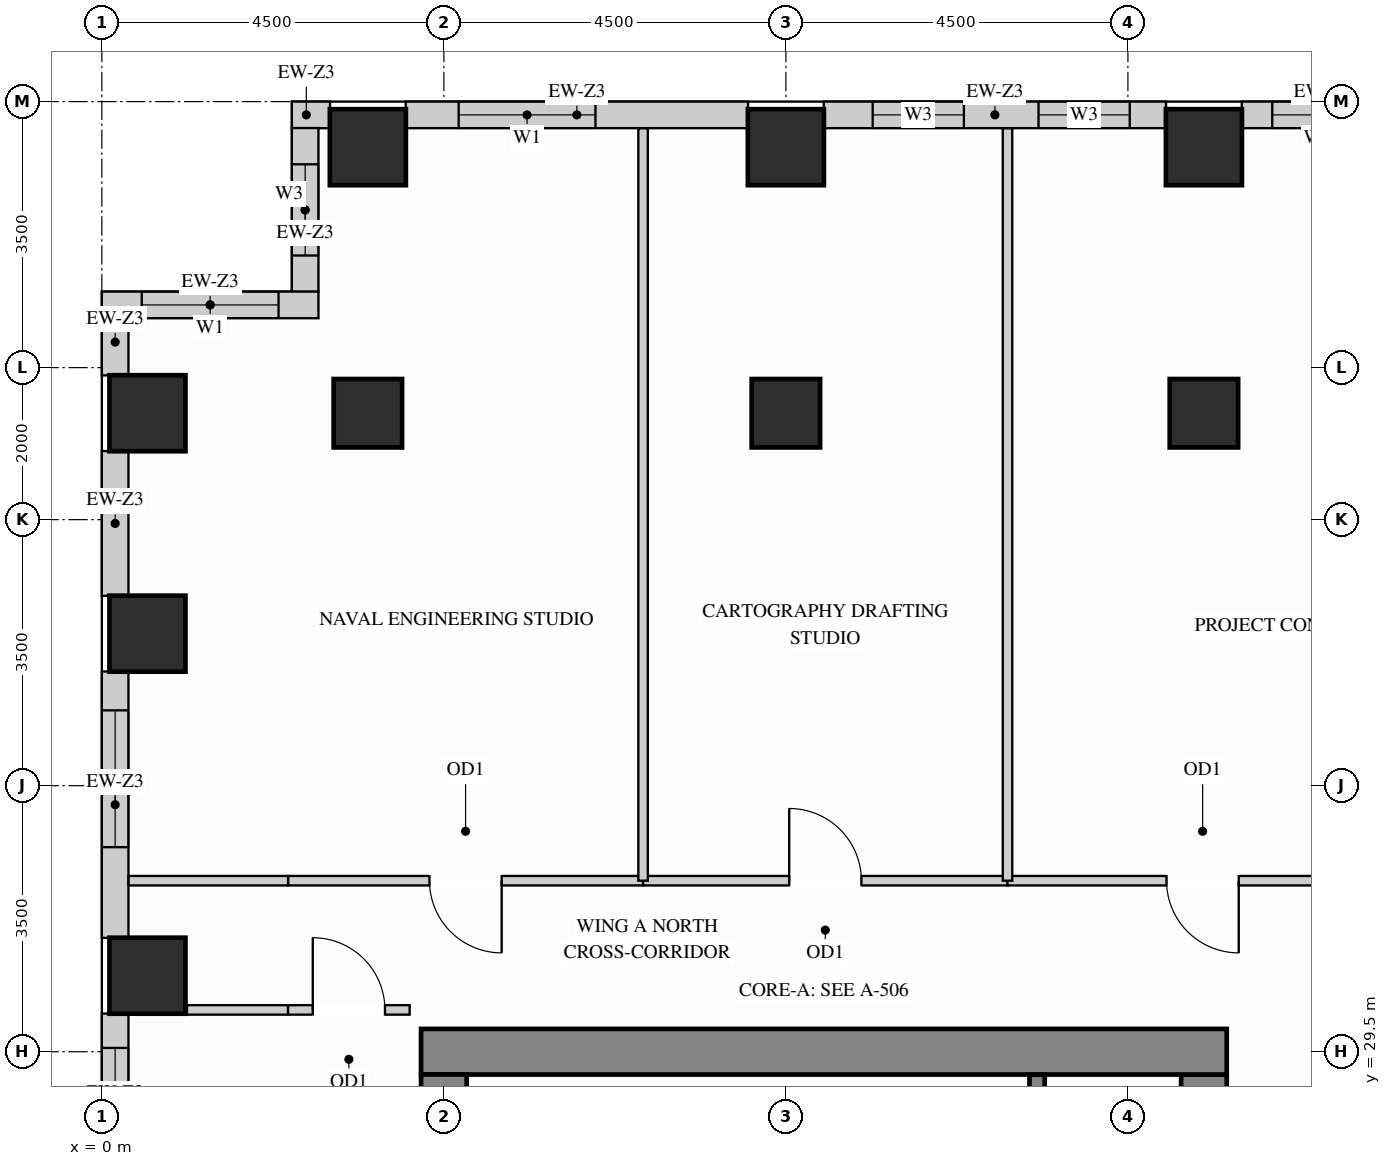
"""IFC4 building model, lengths in metres.
Left out: names, types, materials, properties, quantities, classifications, styles, units other than length and angle.
Written with IfcOpenShell. Run it as: python <this file> out.ifc"""

import sys

from ifc_helpers import new_model, si_unit, direction, frame, frame_2d, origin, origin_2d, place, context, subcontext, project, spatial, rectangle, extrude, source, transform, mapped, element, fill, save


model = new_model("IFC4")
c1 = context("Model", 3, precision=1e-05, world=origin(), true_north=direction((0.0, 1.0)))
c2 = subcontext(c1, "Body", "Model", "MODEL_VIEW")
j1 = project(units=[si_unit("LENGTHUNIT", "METRE"), si_unit("PLANEANGLEUNIT", "RADIAN")], contexts=[c1])
p1 = place(None, origin())
s1 = spatial("IfcSite", under=j1, at=p1, CompositionType="ELEMENT")
p2 = place(p1, origin())
s2 = spatial("IfcBuilding", under=s1, at=p2, CompositionType="ELEMENT")
p3 = place(p2, frame((0.0, 0.0, 150.3)))
s3 = spatial("IfcBuildingStorey", under=s2, at=p3, CompositionType="ELEMENT", Elevation=150.3)
m1 = source(origin(), c2, "Body", "SweptSolid", [
    extrude(rectangle(XDim=0.9, YDim=0.9, at=origin_2d()), origin(), (0.0, 0.0, 1.0), 3.4),
])
for number, where, z_axis, x_axis in (
    (1, (14.5, 37.9, 0.0), (0.0, 0.0, 1.0), (1.0, 0.0, 0.0)),
    (2, (3.5, 37.9, 0.0), (0.0, 0.0, 1.0), (1.0, 0.0, 0.0)),
    (3, (9.0, 37.9, 0.0), (0.0, 0.0, 1.0), (1.0, 0.0, 0.0)),
):
    element("IfcColumn", number, at=place(p3, frame(where, z_axis=z_axis, x_axis=x_axis)), inside=s3, PredefinedType="COLUMN", context=c2, shape_type="MappedRepresentation", body=[
        mapped(m1, transform((0.0, 0.0, 0.0), x_axis=(1.0, 0.0, 0.0), y_axis=(0.0, 1.0, 0.0), z_axis=(0.0, 0.0, 1.0))),
    ])
m2 = source(origin(), c2, "Body", "SweptSolid", [
    extrude(rectangle(XDim=1.0, YDim=1.0, at=origin_2d()), origin(), (0.0, 0.0, 1.0), 3.4),
])
for number, where, z_axis, x_axis in (
    (4, (14.5, 41.4, 0.0), (0.0, 0.0, 1.0), (1.0, 0.0, 0.0)),
    (5, (3.5, 41.4, 0.0), (0.0, 0.0, 1.0), (1.0, 0.0, 0.0)),
    (6, (9.0, 41.4, 0.0), (0.0, 0.0, 1.0), (1.0, 0.0, 0.0)),
    (7, (0.6, 30.5, 0.0), (0.0, 0.0, 1.0), (1.0, 0.0, 0.0)),
    (8, (0.6, 35.0, 0.0), (0.0, 0.0, 1.0), (1.0, 0.0, 0.0)),
    (9, (0.6, 37.9, 0.0), (0.0, 0.0, 1.0), (1.0, 0.0, 0.0)),
):
    element("IfcColumn", number, at=place(p3, frame(where, z_axis=z_axis, x_axis=x_axis)), inside=s3, PredefinedType="COLUMN", context=c2, shape_type="MappedRepresentation", body=[
        mapped(m2, transform((0.0, 0.0, 0.0), x_axis=(1.0, 0.0, 0.0), y_axis=(0.0, 1.0, 0.0), z_axis=(0.0, 0.0, 1.0))),
    ])
m3 = source(origin(), c2, "Body", "SweptSolid", [
    extrude(rectangle(XDim=8.32, YDim=0.6, at=frame_2d((4.16, 0.0))), origin(), (0.0, 0.0, 1.0), 3.4),
])
p4 = place(p3, frame((14.5, 20.88, 0.0), z_axis=(0.0, 0.0, 1.0), x_axis=(0.0, 1.0, 0.0)))
e10 = element("IfcWall", 10, at=p4, inside=s3, PredefinedType="SHEAR", context=c2, shape_type="MappedRepresentation", body=[
    mapped(m3, transform((0.0, 0.0, 0.0), x_axis=(1.0, 0.0, 0.0), y_axis=(0.0, 1.0, 0.0), z_axis=(0.0, 0.0, 1.0))),
])
m4 = source(origin(), c2, "Body", "SweptSolid", [
    extrude(rectangle(XDim=10.6, YDim=0.6, at=frame_2d((5.3, 0.0))), origin(), (0.0, 0.0, 1.0), 3.4),
])
p5 = place(p3, frame((4.2, 29.5, 0.0), z_axis=(0.0, 0.0, 1.0), x_axis=(1.0, 0.0, 0.0)))
e11 = element("IfcWall", 11, at=p5, inside=s3, PredefinedType="SHEAR", context=c2, shape_type="MappedRepresentation", body=[
    mapped(m4, transform((0.0, 0.0, 0.0), x_axis=(1.0, 0.0, 0.0), y_axis=(0.0, 1.0, 0.0), z_axis=(0.0, 0.0, 1.0))),
])
m5 = source(origin(), c2, "Body", "SweptSolid", [
    extrude(rectangle(XDim=20.4, YDim=0.6, at=frame_2d((10.2, 0.0))), origin(), (0.0, 0.0, 1.0), 3.4),
])
p6 = place(p3, frame((4.5, 8.8, 0.0), z_axis=(0.0, 0.0, 1.0), x_axis=(0.0, 1.0, 0.0)))
e12 = element("IfcWall", 12, at=p6, inside=s3, PredefinedType="SHEAR", context=c2, shape_type="MappedRepresentation", body=[
    mapped(m5, transform((0.0, 0.0, 0.0), x_axis=(1.0, 0.0, 0.0), y_axis=(0.0, 1.0, 0.0), z_axis=(0.0, 0.0, 1.0))),
])
p7 = place(p3, frame((17.0, 41.825, 0.0), z_axis=(0.0, 0.0, 1.0), x_axis=(-1.0, 0.0, 0.0)))
e13 = element("IfcWall", 13, at=p7, inside=s3, PredefinedType="SOLIDWALL", context=c2, shape_type="SweptSolid", body=[
    extrude(rectangle(XDim=2.002, YDim=0.35, at=frame_2d((1.001, 0.0))), origin(), (0.0, 0.0, 1.0), 3.385),
])
p8 = place(p7, frame((0.401, 0.0, 0.78)))
e14 = element("IfcOpeningElement", 14, at=p8, cuts=e13, PredefinedType="OPENING", context=c2, shape_type="SweptSolid", body=[
    extrude(rectangle(XDim=1.2, YDim=2.1, at=frame_2d((0.6, 1.05))), frame((0.0, 0.185, 0.0), z_axis=(0.0, -1.0, 0.0), x_axis=(1.0, 0.0, 0.0)), (0.0, 0.0, 1.0), 0.37),
])
p9 = place(p3, frame((14.002, 41.825, 0.0), z_axis=(0.0, 0.0, 1.0), x_axis=(-1.0, 0.0, 0.0)))
e15 = element("IfcWall", 15, at=p9, inside=s3, PredefinedType="SOLIDWALL", context=c2, shape_type="SweptSolid", body=[
    extrude(rectangle(XDim=4.504, YDim=0.35, at=frame_2d((2.252, 0.0))), origin(), (0.0, 0.0, 1.0), 2.612),
])
p10 = place(p9, frame((0.478, 0.0, 0.78)))
e16 = element("IfcOpeningElement", 16, at=p10, cuts=e15, PredefinedType="OPENING", context=c2, shape_type="SweptSolid", body=[
    extrude(rectangle(XDim=1.2, YDim=1.652, at=frame_2d((0.6, 0.826))), frame((0.0, 0.185, 0.0), z_axis=(0.0, -1.0, 0.0), x_axis=(1.0, 0.0, 0.0)), (0.0, 0.0, 1.0), 0.37),
])
p11 = place(p9, frame((2.66, 0.0, 0.78)))
e17 = element("IfcOpeningElement", 17, at=p11, cuts=e15, PredefinedType="OPENING", context=c2, shape_type="SweptSolid", body=[
    extrude(rectangle(XDim=1.2, YDim=1.652, at=frame_2d((0.6, 0.826))), frame((0.0, 0.185, 0.0), z_axis=(0.0, -1.0, 0.0), x_axis=(1.0, 0.0, 0.0)), (0.0, 0.0, 1.0), 0.37),
])
p12 = place(p3, frame((8.502, 41.825, 0.0), z_axis=(0.0, 0.0, 1.0), x_axis=(-1.0, 0.0, 0.0)))
e18 = element("IfcWall", 18, at=p12, inside=s3, PredefinedType="SOLIDWALL", context=c2, shape_type="SweptSolid", body=[
    extrude(rectangle(XDim=4.504, YDim=0.35, at=frame_2d((2.252, 0.0))), origin(), (0.0, 0.0, 1.0), 2.612),
])
p13 = place(p12, frame((2.008, 0.0, 0.78)))
e19 = element("IfcOpeningElement", 19, at=p13, cuts=e18, PredefinedType="OPENING", context=c2, shape_type="SweptSolid", body=[
    extrude(rectangle(XDim=1.8, YDim=1.652, at=frame_2d((0.9, 0.826))), frame((0.0, 0.185, 0.0), z_axis=(0.0, -1.0, 0.0), x_axis=(1.0, 0.0, 0.0)), (0.0, 0.0, 1.0), 0.37),
])
m6 = source(origin(), c2, "Body", "SweptSolid", [
    extrude(rectangle(XDim=0.502, YDim=0.35, at=frame_2d((0.251, 0.0))), origin(), (0.0, 0.0, 1.0), 3.385),
])
p14 = place(p3, frame((3.002, 41.825, 0.0), z_axis=(0.0, 0.0, 1.0), x_axis=(-1.0, 0.0, 0.0)))
e20 = element("IfcWall", 20, at=p14, inside=s3, PredefinedType="SOLIDWALL", context=c2, shape_type="MappedRepresentation", body=[
    mapped(m6, transform((0.0, 0.0, 0.0), x_axis=(1.0, 0.0, 0.0), y_axis=(0.0, 1.0, 0.0), z_axis=(0.0, 0.0, 1.0))),
])
p15 = place(p3, frame((2.675, 41.652, 0.0), z_axis=(0.0, 0.0, 1.0), x_axis=(0.0, -1.0, 0.0)))
e21 = element("IfcWall", 21, at=p15, inside=s3, PredefinedType="SOLIDWALL", context=c2, shape_type="SweptSolid", body=[
    extrude(rectangle(XDim=2.154, YDim=0.35, at=frame_2d((1.077, 0.0))), origin(), (0.0, 0.0, 1.0), 3.385),
])
p16 = place(p15, frame((0.477, 0.0, 0.78)))
e22 = element("IfcOpeningElement", 22, at=p16, cuts=e21, PredefinedType="OPENING", context=c2, shape_type="SweptSolid", body=[
    extrude(rectangle(XDim=1.2, YDim=2.1, at=frame_2d((0.6, 1.05))), frame((0.0, 0.185, 0.0), z_axis=(0.0, -1.0, 0.0), x_axis=(1.0, 0.0, 0.0)), (0.0, 0.0, 1.0), 0.37),
])
p17 = place(p3, frame((2.85, 39.325, 0.0), z_axis=(0.0, 0.0, 1.0), x_axis=(-1.0, 0.0, 0.0)))
e23 = element("IfcWall", 23, at=p17, inside=s3, PredefinedType="SOLIDWALL", context=c2, shape_type="SweptSolid", body=[
    extrude(rectangle(XDim=2.85, YDim=0.35, at=frame_2d((1.425, 0.0))), origin(), (0.0, 0.0, 1.0), 3.385),
])
p18 = place(p17, frame((0.525, 0.0, 0.78)))
e24 = element("IfcOpeningElement", 24, at=p18, cuts=e23, PredefinedType="OPENING", context=c2, shape_type="SweptSolid", body=[
    extrude(rectangle(XDim=1.8, YDim=2.1, at=frame_2d((0.9, 1.05))), frame((0.0, 0.185, 0.0), z_axis=(0.0, -1.0, 0.0), x_axis=(1.0, 0.0, 0.0)), (0.0, 0.0, 1.0), 0.37),
])
m7 = source(origin(), c2, "Body", "SweptSolid", [
    extrude(rectangle(XDim=0.754, YDim=0.35, at=frame_2d((0.377, 0.0))), origin(), (0.0, 0.0, 1.0), 3.385),
])
p19 = place(p3, frame((0.175, 39.152, 0.0), z_axis=(0.0, 0.0, 1.0), x_axis=(0.0, -1.0, 0.0)))
e25 = element("IfcWall", 25, at=p19, inside=s3, PredefinedType="SOLIDWALL", context=c2, shape_type="MappedRepresentation", body=[
    mapped(m7, transform((0.0, 0.0, 0.0), x_axis=(1.0, 0.0, 0.0), y_axis=(0.0, 1.0, 0.0), z_axis=(0.0, 0.0, 1.0))),
])
m8 = source(origin(), c2, "Body", "SweptSolid", [
    extrude(rectangle(XDim=1.904, YDim=0.35, at=frame_2d((0.952, 0.0))), origin(), (0.0, 0.0, 1.0), 2.612),
])
p20 = place(p3, frame((0.175, 37.402, 0.0), z_axis=(0.0, 0.0, 1.0), x_axis=(0.0, -1.0, 0.0)))
e26 = element("IfcWall", 26, at=p20, inside=s3, PredefinedType="SOLIDWALL", context=c2, shape_type="MappedRepresentation", body=[
    mapped(m8, transform((0.0, 0.0, 0.0), x_axis=(1.0, 0.0, 0.0), y_axis=(0.0, 1.0, 0.0), z_axis=(0.0, 0.0, 1.0))),
])
p21 = place(p3, frame((0.175, 34.502, 0.0), z_axis=(0.0, 0.0, 1.0), x_axis=(0.0, -1.0, 0.0)))
e27 = element("IfcWall", 27, at=p21, inside=s3, PredefinedType="SOLIDWALL", context=c2, shape_type="SweptSolid", body=[
    extrude(rectangle(XDim=3.504, YDim=0.35, at=frame_2d((1.752, 0.0))), origin(), (0.0, 0.0, 1.0), 2.612),
])
p22 = place(p21, frame((0.511, 0.0, 0.78)))
e28 = element("IfcOpeningElement", 28, at=p22, cuts=e27, PredefinedType="OPENING", context=c2, shape_type="SweptSolid", body=[
    extrude(rectangle(XDim=1.8, YDim=1.652, at=frame_2d((0.9, 0.826))), frame((0.0, 0.185, 0.0), z_axis=(0.0, -1.0, 0.0), x_axis=(1.0, 0.0, 0.0)), (0.0, 0.0, 1.0), 0.37),
])
p23 = place(p3, frame((0.175, 30.002, 0.0), z_axis=(0.0, 0.0, 1.0), x_axis=(0.0, -1.0, 0.0)))
e29 = element("IfcWall", 29, at=p23, inside=s3, PredefinedType="SOLIDWALL", context=c2, shape_type="SweptSolid", body=[
    extrude(rectangle(XDim=2.704, YDim=0.35, at=frame_2d((1.352, 0.0))), origin(), (0.0, 0.0, 1.0), 2.612),
])
p24 = place(p23, frame((0.452, 0.0, 0.78)))
e30 = element("IfcOpeningElement", 30, at=p24, cuts=e29, PredefinedType="OPENING", context=c2, shape_type="SweptSolid", body=[
    extrude(rectangle(XDim=1.8, YDim=1.652, at=frame_2d((0.9, 0.826))), frame((0.0, 0.185, 0.0), z_axis=(0.0, -1.0, 0.0), x_axis=(1.0, 0.0, 0.0)), (0.0, 0.0, 1.0), 0.37),
])
p25 = place(p3, frame((2.45, 31.75, 0.0), z_axis=(0.0, 0.0, 1.0), x_axis=(1.0, 0.0, 0.0)))
e31 = element("IfcWall", 31, at=p25, inside=s3, PredefinedType="PARTITIONING", context=c2, shape_type="SweptSolid", body=[
    extrude(rectangle(XDim=4.671, YDim=0.125, at=frame_2d((2.335, 0.0))), origin(), (0.0, 0.0, 1.0), 2.848),
])
p26 = place(p25, frame((1.861, 0.0, 0.0)))
e32 = element("IfcOpeningElement", 32, at=p26, cuts=e31, PredefinedType="OPENING", context=c2, shape_type="SweptSolid", body=[
    extrude(rectangle(XDim=0.95, YDim=2.15, at=frame_2d((0.475, 1.075))), frame((0.0, 0.073, 0.0), z_axis=(0.0, -1.0, 0.0), x_axis=(1.0, 0.0, 0.0)), (0.0, 0.0, 1.0), 0.145),
])
p27 = place(p3, frame((7.121, 31.75, 0.0), z_axis=(0.0, 0.0, 1.0), x_axis=(1.0, 0.0, 0.0)))
e33 = element("IfcWall", 33, at=p27, inside=s3, PredefinedType="PARTITIONING", context=c2, shape_type="SweptSolid", body=[
    extrude(rectangle(XDim=4.795, YDim=0.125, at=frame_2d((2.397, 0.0))), origin(), (0.0, 0.0, 1.0), 2.848),
])
p28 = place(p27, frame((1.923, 0.0, 0.0)))
e34 = element("IfcOpeningElement", 34, at=p28, cuts=e33, PredefinedType="OPENING", context=c2, shape_type="SweptSolid", body=[
    extrude(rectangle(XDim=0.95, YDim=2.15, at=frame_2d((0.475, 1.075))), frame((0.0, 0.073, 0.0), z_axis=(0.0, -1.0, 0.0), x_axis=(1.0, 0.0, 0.0)), (0.0, 0.0, 1.0), 0.145),
])
p29 = place(p3, frame((11.916, 31.75, 0.0), z_axis=(0.0, 0.0, 1.0), x_axis=(1.0, 0.0, 0.0)))
e35 = element("IfcWall", 35, at=p29, inside=s3, PredefinedType="PARTITIONING", context=c2, shape_type="SweptSolid", body=[
    extrude(rectangle(XDim=5.134, YDim=0.125, at=frame_2d((2.567, 0.0))), origin(), (0.0, 0.0, 1.0), 2.848),
])
p30 = place(p29, frame((2.092, 0.0, 0.0)))
e36 = element("IfcOpeningElement", 36, at=p30, cuts=e35, PredefinedType="OPENING", context=c2, shape_type="SweptSolid", body=[
    extrude(rectangle(XDim=0.95, YDim=2.15, at=frame_2d((0.475, 1.075))), frame((0.0, 0.073, 0.0), z_axis=(0.0, -1.0, 0.0), x_axis=(1.0, 0.0, 0.0)), (0.0, 0.0, 1.0), 0.145),
])
m9 = source(origin(), c2, "Body", "SweptSolid", [
    extrude(rectangle(XDim=2.098, YDim=0.125, at=frame_2d((1.049, 0.0))), origin(), (0.0, 0.0, 1.0), 2.848),
])
p31 = place(p3, frame((0.352, 31.75, 0.0), z_axis=(0.0, 0.0, 1.0), x_axis=(1.0, 0.0, 0.0)))
e37 = element("IfcWall", 37, at=p31, inside=s3, PredefinedType="PARTITIONING", context=c2, shape_type="MappedRepresentation", body=[
    mapped(m9, transform((0.0, 0.0, 0.0), x_axis=(1.0, 0.0, 0.0), y_axis=(0.0, 1.0, 0.0), z_axis=(0.0, 0.0, 1.0))),
])
m10 = source(origin(), c2, "Body", "SweptSolid", [
    extrude(rectangle(XDim=9.898, YDim=0.125, at=frame_2d((4.949, 0.0))), origin(), (0.0, 0.0, 1.0), 3.385),
])
for number, where, z_axis, x_axis in (
    (38, (7.121, 31.75, 0.0), (0.0, 0.0, 1.0), (0.0, 1.0, 0.0)),
    (39, (11.916, 31.75, 0.0), (0.0, 0.0, 1.0), (0.0, 1.0, 0.0)),
):
    element("IfcWall", number, at=place(p3, frame(where, z_axis=z_axis, x_axis=x_axis)), inside=s3, PredefinedType="PARTITIONING", context=c2, shape_type="MappedRepresentation", body=[
        mapped(m10, transform((0.0, 0.0, 0.0), x_axis=(1.0, 0.0, 0.0), y_axis=(0.0, 1.0, 0.0), z_axis=(0.0, 0.0, 1.0))),
    ])
m11 = source(origin(), c2, "Body", "SweptSolid", [
    extrude(rectangle(XDim=1.33, YDim=0.125, at=frame_2d((0.665, 0.0))), origin(), (0.0, 0.0, 1.0), 3.385),
])
p32 = place(p3, frame((1.12, 30.05, 0.0), z_axis=(0.0, 0.0, 1.0), x_axis=(1.0, 0.0, 0.0)))
e40 = element("IfcWall", 40, at=p32, inside=s3, PredefinedType="PARTITIONING", context=c2, shape_type="MappedRepresentation", body=[
    mapped(m11, transform((0.0, 0.0, 0.0), x_axis=(1.0, 0.0, 0.0), y_axis=(0.0, 1.0, 0.0), z_axis=(0.0, 0.0, 1.0))),
])
p33 = place(p3, frame((2.45, 30.05, 0.0), z_axis=(0.0, 0.0, 1.0), x_axis=(1.0, 0.0, 0.0)))
e41 = element("IfcWall", 41, at=p33, inside=s3, PredefinedType="PARTITIONING", context=c2, shape_type="SweptSolid", body=[
    extrude(rectangle(XDim=1.6, YDim=0.125, at=frame_2d((0.8, 0.0))), origin(), (0.0, 0.0, 1.0), 3.385),
])
p34 = place(p33, frame((0.325, 0.0, 0.0)))
e42 = element("IfcOpeningElement", 42, at=p34, cuts=e41, PredefinedType="OPENING", context=c2, shape_type="SweptSolid", body=[
    extrude(rectangle(XDim=0.95, YDim=2.15, at=frame_2d((0.475, 1.075))), frame((0.0, 0.073, 0.0), z_axis=(0.0, -1.0, 0.0), x_axis=(1.0, 0.0, 0.0)), (0.0, 0.0, 1.0), 0.145),
])
m12 = source(origin(), c2, "Body", "SweptSolid", [
    extrude(rectangle(XDim=3.753, YDim=0.2, at=frame_2d((1.876, 0.0))), origin(), (0.0, 0.0, 1.0), 3.4),
])
p35 = place(p3, frame((12.305, 25.445, 0.0), z_axis=(0.0, 0.0, 1.0), x_axis=(0.0, 1.0, 0.0)))
e43 = element("IfcWall", 43, at=p35, inside=s3, PredefinedType="SHEAR", context=c2, shape_type="MappedRepresentation", body=[
    mapped(m12, transform((0.0, 0.0, 0.0), x_axis=(1.0, 0.0, 0.0), y_axis=(0.0, 1.0, 0.0), z_axis=(0.0, 0.0, 1.0))),
])
m13 = source(origin(), c2, "Body", "SweptSolid", [
    extrude(rectangle(XDim=0.95, YDim=2.15, at=frame_2d((0.475, 1.075))), frame((0.0, 0.025, 0.0), z_axis=(0.0, -1.0, 0.0), x_axis=(1.0, 0.0, 0.0)), (0.0, 0.0, 1.0), 0.05),
])
p36 = place(p26, origin())
e44 = element("IfcDoor", 44, at=p36, inside=s3, OperationType="SINGLE_SWING_RIGHT", PredefinedType="DOOR", context=c2, shape_type="MappedRepresentation", body=[
    mapped(m13, transform((0.0, 0.0, 0.0), x_axis=(1.0, 0.0, 0.0), y_axis=(0.0, 1.0, 0.0), z_axis=(0.0, 0.0, 1.0))),
])
fill(e32, e44)
p37 = place(p28, origin())
e45 = element("IfcDoor", 45, at=p37, inside=s3, OperationType="SINGLE_SWING_LEFT", PredefinedType="DOOR", context=c2, shape_type="MappedRepresentation", body=[
    mapped(m13, transform((0.0, 0.0, 0.0), x_axis=(1.0, 0.0, 0.0), y_axis=(0.0, 1.0, 0.0), z_axis=(0.0, 0.0, 1.0))),
])
fill(e34, e45)
p38 = place(p30, origin())
e46 = element("IfcDoor", 46, at=p38, inside=s3, OperationType="SINGLE_SWING_RIGHT", PredefinedType="DOOR", context=c2, shape_type="MappedRepresentation", body=[
    mapped(m13, transform((0.0, 0.0, 0.0), x_axis=(1.0, 0.0, 0.0), y_axis=(0.0, 1.0, 0.0), z_axis=(0.0, 0.0, 1.0))),
])
fill(e36, e46)
p39 = place(p34, origin())
e47 = element("IfcDoor", 47, at=p39, inside=s3, OperationType="SINGLE_SWING_LEFT", PredefinedType="DOOR", context=c2, shape_type="MappedRepresentation", body=[
    mapped(m13, transform((0.0, 0.0, 0.0), x_axis=(1.0, 0.0, 0.0), y_axis=(0.0, 1.0, 0.0), z_axis=(0.0, 0.0, 1.0))),
])
fill(e42, e47)
m14 = source(origin(), c2, "Body", "SweptSolid", [
    extrude(rectangle(XDim=1.8, YDim=1.652, at=frame_2d((0.9, 0.826))), frame((0.0, 0.03, 0.0), z_axis=(0.0, -1.0, 0.0), x_axis=(1.0, 0.0, 0.0)), (0.0, 0.0, 1.0), 0.06),
])
p40 = place(p13, origin())
e48 = element("IfcWindow", 48, at=p40, inside=s3, PartitioningType="SINGLE_PANEL", PredefinedType="WINDOW", context=c2, shape_type="MappedRepresentation", body=[
    mapped(m14, transform((0.0, 0.0, 0.0), x_axis=(1.0, 0.0, 0.0), y_axis=(0.0, 1.0, 0.0), z_axis=(0.0, 0.0, 1.0))),
])
fill(e19, e48)
m15 = source(origin(), c2, "Body", "SweptSolid", [
    extrude(rectangle(XDim=1.8, YDim=2.1, at=frame_2d((0.9, 1.05))), frame((0.0, 0.03, 0.0), z_axis=(0.0, -1.0, 0.0), x_axis=(1.0, 0.0, 0.0)), (0.0, 0.0, 1.0), 0.06),
])
p41 = place(p18, origin())
e49 = element("IfcWindow", 49, at=p41, inside=s3, PartitioningType="SINGLE_PANEL", PredefinedType="WINDOW", context=c2, shape_type="MappedRepresentation", body=[
    mapped(m15, transform((0.0, 0.0, 0.0), x_axis=(1.0, 0.0, 0.0), y_axis=(0.0, 1.0, 0.0), z_axis=(0.0, 0.0, 1.0))),
])
fill(e24, e49)
p42 = place(p22, origin())
e50 = element("IfcWindow", 50, at=p42, inside=s3, PartitioningType="SINGLE_PANEL", PredefinedType="WINDOW", context=c2, shape_type="MappedRepresentation", body=[
    mapped(m14, transform((0.0, 0.0, 0.0), x_axis=(1.0, 0.0, 0.0), y_axis=(0.0, 1.0, 0.0), z_axis=(0.0, 0.0, 1.0))),
])
fill(e28, e50)
p43 = place(p24, origin())
e51 = element("IfcWindow", 51, at=p43, inside=s3, PartitioningType="SINGLE_PANEL", PredefinedType="WINDOW", context=c2, shape_type="MappedRepresentation", body=[
    mapped(m14, transform((0.0, 0.0, 0.0), x_axis=(1.0, 0.0, 0.0), y_axis=(0.0, 1.0, 0.0), z_axis=(0.0, 0.0, 1.0))),
])
fill(e30, e51)
m16 = source(origin(), c2, "Body", "SweptSolid", [
    extrude(rectangle(XDim=1.2, YDim=2.1, at=frame_2d((0.6, 1.05))), frame((0.0, 0.03, 0.0), z_axis=(0.0, -1.0, 0.0), x_axis=(1.0, 0.0, 0.0)), (0.0, 0.0, 1.0), 0.06),
])
p44 = place(p8, origin())
e52 = element("IfcWindow", 52, at=p44, inside=s3, PartitioningType="SINGLE_PANEL", PredefinedType="WINDOW", context=c2, shape_type="MappedRepresentation", body=[
    mapped(m16, transform((0.0, 0.0, 0.0), x_axis=(1.0, 0.0, 0.0), y_axis=(0.0, 1.0, 0.0), z_axis=(0.0, 0.0, 1.0))),
])
fill(e14, e52)
m17 = source(origin(), c2, "Body", "SweptSolid", [
    extrude(rectangle(XDim=1.2, YDim=1.652, at=frame_2d((0.6, 0.826))), frame((0.0, 0.03, 0.0), z_axis=(0.0, -1.0, 0.0), x_axis=(1.0, 0.0, 0.0)), (0.0, 0.0, 1.0), 0.06),
])
p45 = place(p10, origin())
e53 = element("IfcWindow", 53, at=p45, inside=s3, PartitioningType="SINGLE_PANEL", PredefinedType="WINDOW", context=c2, shape_type="MappedRepresentation", body=[
    mapped(m17, transform((0.0, 0.0, 0.0), x_axis=(1.0, 0.0, 0.0), y_axis=(0.0, 1.0, 0.0), z_axis=(0.0, 0.0, 1.0))),
])
fill(e16, e53)
p46 = place(p11, origin())
e54 = element("IfcWindow", 54, at=p46, inside=s3, PartitioningType="SINGLE_PANEL", PredefinedType="WINDOW", context=c2, shape_type="MappedRepresentation", body=[
    mapped(m17, transform((0.0, 0.0, 0.0), x_axis=(1.0, 0.0, 0.0), y_axis=(0.0, 1.0, 0.0), z_axis=(0.0, 0.0, 1.0))),
])
fill(e17, e54)
p47 = place(p16, origin())
e55 = element("IfcWindow", 55, at=p47, inside=s3, PartitioningType="SINGLE_PANEL", PredefinedType="WINDOW", context=c2, shape_type="MappedRepresentation", body=[
    mapped(m16, transform((0.0, 0.0, 0.0), x_axis=(1.0, 0.0, 0.0), y_axis=(0.0, 1.0, 0.0), z_axis=(0.0, 0.0, 1.0))),
])
fill(e22, e55)
save(model, sys.argv[1])
